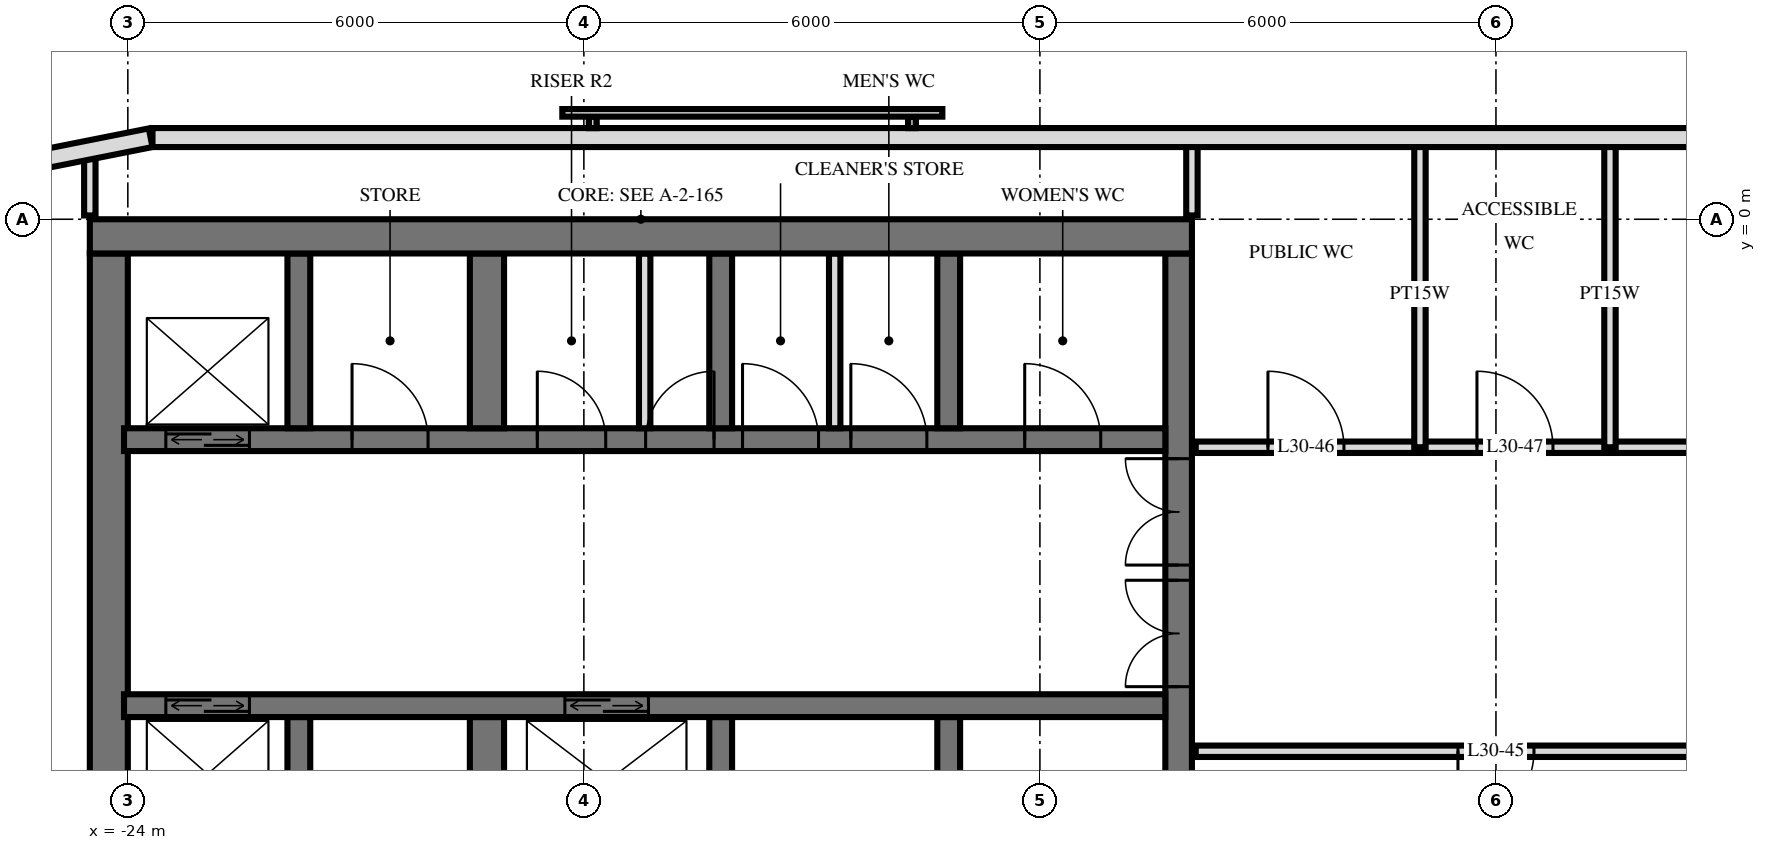
"""IFC4 building model, lengths in metres.
Left out: names, types, materials, properties, quantities, classifications, styles, units other than length and angle.
Written with IfcOpenShell. Run it as: python <this file> out.ifc"""

import sys

from ifc_helpers import new_model, si_unit, direction, frame, frame_2d, origin, place, context, subcontext, project, spatial, rectangle, extrude, element, fill, save


model = new_model("IFC4")
c1 = context("Model", 3, precision=1e-05, world=origin(), true_north=direction((0.0, 1.0)))
c2 = subcontext(c1, "Body", "Model", "MODEL_VIEW")
j1 = project(units=[si_unit("LENGTHUNIT", "METRE"), si_unit("PLANEANGLEUNIT", "RADIAN")], contexts=[c1])
p1 = place(None, origin())
s1 = spatial("IfcSite", under=j1, at=p1, CompositionType="ELEMENT")
p2 = place(p1, origin())
s2 = spatial("IfcBuilding", under=s1, at=p2, CompositionType="ELEMENT")
p3 = place(p2, frame((0.0, 0.0, 120.0)))
s3 = spatial("IfcBuildingStorey", under=s2, at=p3, CompositionType="ELEMENT", Elevation=120.0)
p4 = place(p3, frame((-24.5, -0.225, 0.0), z_axis=(0.0, 0.0, 1.0), x_axis=(1.0, 0.0, 0.0)))
e1 = element("IfcWall", 1, at=p4, inside=s3, PredefinedType="SHEAR", context=c2, shape_type="SweptSolid", body=[
    extrude(rectangle(XDim=14.5, YDim=0.45, at=frame_2d((7.25, 0.0))), origin(), (0.0, 0.0, 1.0), 3.6),
])
p5 = place(p3, frame((-10.175, -14.55, 0.0), z_axis=(0.0, 0.0, 1.0), x_axis=(0.0, 1.0, 0.0)))
e2 = element("IfcWall", 2, at=p5, inside=s3, PredefinedType="SHEAR", context=c2, shape_type="SweptSolid", body=[
    extrude(rectangle(XDim=14.1, YDim=0.35, at=frame_2d((7.05, 0.0))), origin(), (0.0, 0.0, 1.0), 3.6),
])
p6 = place(p5, frame((8.4, 0.0, 0.0)))
e3 = element("IfcOpeningElement", 3, at=p6, cuts=e2, PredefinedType="OPENING", context=c2, shape_type="SweptSolid", body=[
    extrude(rectangle(XDim=1.4, YDim=2.4, at=frame_2d((0.7, 1.2))), frame((0.0, 0.185, 0.0), z_axis=(0.0, -1.0, 0.0), x_axis=(1.0, 0.0, 0.0)), (0.0, 0.0, 1.0), 0.37),
])
p7 = place(p5, frame((10.0, 0.0, 0.0)))
e4 = element("IfcOpeningElement", 4, at=p7, cuts=e2, PredefinedType="OPENING", context=c2, shape_type="SweptSolid", body=[
    extrude(rectangle(XDim=1.4, YDim=2.4, at=frame_2d((0.7, 1.2))), frame((0.0, 0.185, 0.0), z_axis=(0.0, -1.0, 0.0), x_axis=(1.0, 0.0, 0.0)), (0.0, 0.0, 1.0), 0.37),
])
p8 = place(p5, frame((4.0, 0.0, 0.0)))
e5 = element("IfcOpeningElement", 5, at=p8, cuts=e2, PredefinedType="OPENING", context=c2, shape_type="SweptSolid", body=[
    extrude(rectangle(XDim=1.2, YDim=2.1, at=frame_2d((0.6, 1.05))), frame((0.0, 0.185, 0.0), z_axis=(0.0, -1.0, 0.0), x_axis=(1.0, 0.0, 0.0)), (0.0, 0.0, 1.0), 0.37),
])
p9 = place(p3, frame((-24.25, -14.55, 0.0), z_axis=(0.0, 0.0, 1.0), x_axis=(0.0, 1.0, 0.0)))
e6 = element("IfcWall", 6, at=p9, inside=s3, PredefinedType="SHEAR", context=c2, shape_type="SweptSolid", body=[
    extrude(rectangle(XDim=14.1, YDim=0.5, at=frame_2d((7.05, 0.0))), origin(), (0.0, 0.0, 1.0), 3.6),
])
p10 = place(p3, frame((-24.05, -2.9, 0.0), z_axis=(0.0, 0.0, 1.0), x_axis=(1.0, 0.0, 0.0)))
e7 = element("IfcWall", 7, at=p10, inside=s3, PredefinedType="SHEAR", context=c2, shape_type="SweptSolid", body=[
    extrude(rectangle(XDim=13.7, YDim=0.3, at=frame_2d((6.85, 0.0))), origin(), (0.0, 0.0, 1.0), 3.6),
])
p11 = place(p10, frame((0.55, 0.0, 0.0)))
e8 = element("IfcOpeningElement", 8, at=p11, cuts=e7, PredefinedType="OPENING", context=c2, shape_type="SweptSolid", body=[
    extrude(rectangle(XDim=1.1, YDim=2.1, at=frame_2d((0.55, 1.05))), frame((0.0, 0.16, 0.0), z_axis=(0.0, -1.0, 0.0), x_axis=(1.0, 0.0, 0.0)), (0.0, 0.0, 1.0), 0.32),
])
p12 = place(p10, frame((6.863, 0.0, 0.0)))
e9 = element("IfcOpeningElement", 9, at=p12, cuts=e7, PredefinedType="OPENING", context=c2, shape_type="SweptSolid", body=[
    extrude(rectangle(XDim=0.9, YDim=2.1, at=frame_2d((0.45, 1.05))), frame((0.0, 0.16, 0.0), z_axis=(0.0, -1.0, 0.0), x_axis=(1.0, 0.0, 0.0)), (0.0, 0.0, 1.0), 0.32),
])
p13 = place(p10, frame((5.438, 0.0, 0.0)))
e10 = element("IfcOpeningElement", 10, at=p13, cuts=e7, PredefinedType="OPENING", context=c2, shape_type="SweptSolid", body=[
    extrude(rectangle(XDim=0.9, YDim=2.1, at=frame_2d((0.45, 1.05))), frame((0.0, 0.16, 0.0), z_axis=(0.0, -1.0, 0.0), x_axis=(1.0, 0.0, 0.0)), (0.0, 0.0, 1.0), 0.32),
])
p14 = place(p10, frame((11.85, 0.0, 0.0)))
e11 = element("IfcOpeningElement", 11, at=p14, cuts=e7, PredefinedType="OPENING", context=c2, shape_type="SweptSolid", body=[
    extrude(rectangle(XDim=1.0, YDim=2.1, at=frame_2d((0.5, 1.05))), frame((0.0, 0.16, 0.0), z_axis=(0.0, -1.0, 0.0), x_axis=(1.0, 0.0, 0.0)), (0.0, 0.0, 1.0), 0.32),
])
p15 = place(p10, frame((9.562, 0.0, 0.0)))
e12 = element("IfcOpeningElement", 12, at=p15, cuts=e7, PredefinedType="OPENING", context=c2, shape_type="SweptSolid", body=[
    extrude(rectangle(XDim=1.0, YDim=2.1, at=frame_2d((0.5, 1.05))), frame((0.0, 0.16, 0.0), z_axis=(0.0, -1.0, 0.0), x_axis=(1.0, 0.0, 0.0)), (0.0, 0.0, 1.0), 0.32),
])
p16 = place(p10, frame((8.137, 0.0, 0.0)))
e13 = element("IfcOpeningElement", 13, at=p16, cuts=e7, PredefinedType="OPENING", context=c2, shape_type="SweptSolid", body=[
    extrude(rectangle(XDim=1.0, YDim=2.1, at=frame_2d((0.5, 1.05))), frame((0.0, 0.16, 0.0), z_axis=(0.0, -1.0, 0.0), x_axis=(1.0, 0.0, 0.0)), (0.0, 0.0, 1.0), 0.32),
])
p17 = place(p10, frame((3.0, 0.0, 0.0)))
e14 = element("IfcOpeningElement", 14, at=p17, cuts=e7, PredefinedType="OPENING", context=c2, shape_type="SweptSolid", body=[
    extrude(rectangle(XDim=1.0, YDim=2.1, at=frame_2d((0.5, 1.05))), frame((0.0, 0.16, 0.0), z_axis=(0.0, -1.0, 0.0), x_axis=(1.0, 0.0, 0.0)), (0.0, 0.0, 1.0), 0.32),
])
p18 = place(p3, frame((-24.05, -6.4, 0.0), z_axis=(0.0, 0.0, 1.0), x_axis=(1.0, 0.0, 0.0)))
e15 = element("IfcWall", 15, at=p18, inside=s3, PredefinedType="SHEAR", context=c2, shape_type="SweptSolid", body=[
    extrude(rectangle(XDim=13.7, YDim=0.3, at=frame_2d((6.85, 0.0))), origin(), (0.0, 0.0, 1.0), 3.6),
])
p19 = place(p18, frame((0.55, 0.0, 0.0)))
e16 = element("IfcOpeningElement", 16, at=p19, cuts=e15, PredefinedType="OPENING", context=c2, shape_type="SweptSolid", body=[
    extrude(rectangle(XDim=1.1, YDim=2.1, at=frame_2d((0.55, 1.05))), frame((0.0, 0.16, 0.0), z_axis=(0.0, -1.0, 0.0), x_axis=(1.0, 0.0, 0.0)), (0.0, 0.0, 1.0), 0.32),
])
p20 = place(p18, frame((5.8, 0.0, 0.0)))
e17 = element("IfcOpeningElement", 17, at=p20, cuts=e15, PredefinedType="OPENING", context=c2, shape_type="SweptSolid", body=[
    extrude(rectangle(XDim=1.1, YDim=2.1, at=frame_2d((0.55, 1.05))), frame((0.0, 0.16, 0.0), z_axis=(0.0, -1.0, 0.0), x_axis=(1.0, 0.0, 0.0)), (0.0, 0.0, 1.0), 0.32),
])
for number, where, z_axis, x_axis in (
    (18, (-13.2, -2.75, 0.0), (0.0, 0.0, 1.0), (0.0, 1.0, 0.0)),
    (19, (-13.2, -8.85, 0.0), (0.0, 0.0, 1.0), (0.0, 1.0, 0.0)),
    (20, (-16.2, -2.75, 0.0), (0.0, 0.0, 1.0), (0.0, 1.0, 0.0)),
    (21, (-16.2, -8.85, 0.0), (0.0, 0.0, 1.0), (0.0, 1.0, 0.0)),
):
    element("IfcWall", number, at=place(p3, frame(where, z_axis=z_axis, x_axis=x_axis)), inside=s3, PredefinedType="SHEAR", context=c2, shape_type="SweptSolid", body=[
        extrude(rectangle(XDim=2.3, YDim=0.3, at=frame_2d((1.15, 0.0))), origin(), (0.0, 0.0, 1.0), 3.6),
    ])
for number, where, z_axis, x_axis in (
    (22, (-19.275, -2.75, 0.0), (0.0, 0.0, 1.0), (0.0, 1.0, 0.0)),
    (23, (-19.275, -8.85, 0.0), (0.0, 0.0, 1.0), (0.0, 1.0, 0.0)),
):
    element("IfcWall", number, at=place(p3, frame(where, z_axis=z_axis, x_axis=x_axis)), inside=s3, PredefinedType="SHEAR", context=c2, shape_type="SweptSolid", body=[
        extrude(rectangle(XDim=2.3, YDim=0.45, at=frame_2d((1.15, 0.0))), origin(), (0.0, 0.0, 1.0), 3.6),
    ])
for number, where, z_axis, x_axis in (
    (24, (-21.75, -2.75, 0.0), (0.0, 0.0, 1.0), (0.0, 1.0, 0.0)),
    (25, (-21.75, -8.85, 0.0), (0.0, 0.0, 1.0), (0.0, 1.0, 0.0)),
):
    element("IfcWall", number, at=place(p3, frame(where, z_axis=z_axis, x_axis=x_axis)), inside=s3, PredefinedType="SHEAR", context=c2, shape_type="SweptSolid", body=[
        extrude(rectangle(XDim=2.3, YDim=0.3, at=frame_2d((1.15, 0.0))), origin(), (0.0, 0.0, 1.0), 3.6),
    ])
p21 = place(p3, frame((23.675, 1.075, 0.0), z_axis=(0.0, 0.0, 1.0), x_axis=(-1.0, 0.0, 0.0)))
e26 = element("IfcWall", 26, at=p21, inside=s3, PredefinedType="SOLIDWALL", context=c2, shape_type="SweptSolid", body=[
    extrude(rectangle(XDim=47.351, YDim=0.25, at=frame_2d((23.675, 0.0))), origin(), (0.0, 0.0, 1.0), 3.32),
])
p22 = place(p21, frame((15.275, 0.0, 0.3)))
e27 = element("IfcOpeningElement", 27, at=p22, cuts=e26, PredefinedType="OPENING", context=c2, shape_type="SweptSolid", body=[
    extrude(rectangle(XDim=2.4, YDim=2.1, at=frame_2d((1.2, 1.05))), frame((0.0, 0.135, 0.0), z_axis=(0.0, -1.0, 0.0), x_axis=(1.0, 0.0, 0.0)), (0.0, 0.0, 1.0), 0.27),
])
p23 = place(p21, frame((18.275, 0.0, 0.3)))
e28 = element("IfcOpeningElement", 28, at=p23, cuts=e26, PredefinedType="OPENING", context=c2, shape_type="SweptSolid", body=[
    extrude(rectangle(XDim=2.4, YDim=2.1, at=frame_2d((1.2, 1.05))), frame((0.0, 0.135, 0.0), z_axis=(0.0, -1.0, 0.0), x_axis=(1.0, 0.0, 0.0)), (0.0, 0.0, 1.0), 0.27),
])
p24 = place(p21, frame((24.275, 0.0, 0.3)))
e29 = element("IfcOpeningElement", 29, at=p24, cuts=e26, PredefinedType="OPENING", context=c2, shape_type="SweptSolid", body=[
    extrude(rectangle(XDim=2.4, YDim=2.1, at=frame_2d((1.2, 1.05))), frame((0.0, 0.135, 0.0), z_axis=(0.0, -1.0, 0.0), x_axis=(1.0, 0.0, 0.0)), (0.0, 0.0, 1.0), 0.27),
])
p25 = place(p3, frame((-23.7, 1.073, 0.0), z_axis=(0.0, 0.0, 1.0), x_axis=(-0.980803419081, -0.194999110559, 0.0)))
e30 = element("IfcWall", 30, at=p25, inside=s3, PredefinedType="SOLIDWALL", context=c2, shape_type="SweptSolid", body=[
    extrude(rectangle(XDim=1.681, YDim=0.25, at=frame_2d((0.841, 0.0))), origin(), (0.0, 0.0, 1.0), 3.32),
])
for number, where, z_axis, x_axis in (
    (31, (-17.2, -2.75, 0.0), (0.0, 0.0, 1.0), (0.0, 1.0, 0.0)),
    (32, (-14.7, -2.75, 0.0), (0.0, 0.0, 1.0), (0.0, 1.0, 0.0)),
):
    element("IfcWall", number, at=place(p3, frame(where, z_axis=z_axis, x_axis=x_axis)), inside=s3, PredefinedType="PARTITIONING", context=c2, shape_type="SweptSolid", body=[
        extrude(rectangle(XDim=2.3, YDim=0.15, at=frame_2d((1.15, 0.0))), origin(), (0.0, 0.0, 1.0), 3.3),
    ])
for number, where, z_axis, x_axis in (
    (33, (-4.5, -3.0, 0.0), (0.0, 0.0, 1.0), (0.0, 1.0, 0.0)),
    (34, (-7.0, -3.0, 0.0), (0.0, 0.0, 1.0), (0.0, 1.0, 0.0)),
):
    element("IfcWall", number, at=place(p3, frame(where, z_axis=z_axis, x_axis=x_axis)), inside=s3, PredefinedType="PLUMBINGWALL", context=c2, shape_type="SweptSolid", body=[
        extrude(rectangle(XDim=4.02, YDim=0.15, at=frame_2d((2.01, 0.0))), origin(), (0.0, 0.0, 1.0), 3.32),
    ])
p26 = place(p3, frame((-10.0, 0.05, 0.0), z_axis=(0.0, 0.0, 1.0), x_axis=(0.0, 1.0, 0.0)))
e35 = element("IfcWall", 35, at=p26, inside=s3, PredefinedType="PLUMBINGWALL", context=c2, shape_type="SweptSolid", body=[
    extrude(rectangle(XDim=0.97, YDim=0.15, at=frame_2d((0.485, 0.0))), origin(), (0.0, 0.0, 1.0), 3.32),
])
p27 = place(p3, frame((-24.5, 0.05, 0.0), z_axis=(0.0, 0.0, 1.0), x_axis=(0.0, 1.0, 0.0)))
e36 = element("IfcWall", 36, at=p27, inside=s3, PredefinedType="PARTITIONING", context=c2, shape_type="SweptSolid", body=[
    extrude(rectangle(XDim=0.807, YDim=0.15, at=frame_2d((0.404, 0.0))), origin(), (0.0, 0.0, 1.0), 3.32),
])
p28 = place(p3, frame((-9.95, -7.0, 0.0), z_axis=(0.0, 0.0, 1.0), x_axis=(1.0, 0.0, 0.0)))
e37 = element("IfcWall", 37, at=p28, inside=s3, PredefinedType="PARTITIONING", context=c2, shape_type="SweptSolid", body=[
    extrude(rectangle(XDim=19.9, YDim=0.15, at=frame_2d((9.95, 0.0))), origin(), (0.0, 0.0, 1.0), 3.32),
])
p29 = place(p28, frame((9.45, 0.0, 0.0)))
e38 = element("IfcOpeningElement", 38, at=p29, cuts=e37, PredefinedType="OPENING", context=c2, shape_type="SweptSolid", body=[
    extrude(rectangle(XDim=1.0, YDim=2.1, at=frame_2d((0.5, 1.05))), frame((0.0, 0.085, 0.0), z_axis=(0.0, -1.0, 0.0), x_axis=(1.0, 0.0, 0.0)), (0.0, 0.0, 1.0), 0.17),
])
p30 = place(p28, frame((3.45, 0.0, 0.0)))
e39 = element("IfcOpeningElement", 39, at=p30, cuts=e37, PredefinedType="OPENING", context=c2, shape_type="SweptSolid", body=[
    extrude(rectangle(XDim=1.0, YDim=2.1, at=frame_2d((0.5, 1.05))), frame((0.0, 0.085, 0.0), z_axis=(0.0, -1.0, 0.0), x_axis=(1.0, 0.0, 0.0)), (0.0, 0.0, 1.0), 0.17),
])
p31 = place(p3, frame((-9.95, -3.0, 0.0), z_axis=(0.0, 0.0, 1.0), x_axis=(1.0, 0.0, 0.0)))
e40 = element("IfcWall", 40, at=p31, inside=s3, PredefinedType="PARTITIONING", context=c2, shape_type="SweptSolid", body=[
    extrude(rectangle(XDim=19.9, YDim=0.15, at=frame_2d((9.95, 0.0))), origin(), (0.0, 0.0, 1.0), 3.32),
])
p32 = place(p31, frame((0.95, 0.0, 0.0)))
e41 = element("IfcOpeningElement", 41, at=p32, cuts=e40, PredefinedType="OPENING", context=c2, shape_type="SweptSolid", body=[
    extrude(rectangle(XDim=1.0, YDim=2.1, at=frame_2d((0.5, 1.05))), frame((0.0, 0.085, 0.0), z_axis=(0.0, -1.0, 0.0), x_axis=(1.0, 0.0, 0.0)), (0.0, 0.0, 1.0), 0.17),
])
p33 = place(p31, frame((3.7, 0.0, 0.0)))
e42 = element("IfcOpeningElement", 42, at=p33, cuts=e40, PredefinedType="OPENING", context=c2, shape_type="SweptSolid", body=[
    extrude(rectangle(XDim=1.0, YDim=2.1, at=frame_2d((0.5, 1.05))), frame((0.0, 0.085, 0.0), z_axis=(0.0, -1.0, 0.0), x_axis=(1.0, 0.0, 0.0)), (0.0, 0.0, 1.0), 0.17),
])
p34 = place(p31, frame((8.45, 0.0, 0.0)))
e43 = element("IfcOpeningElement", 43, at=p34, cuts=e40, PredefinedType="OPENING", context=c2, shape_type="SweptSolid", body=[
    extrude(rectangle(XDim=1.0, YDim=2.1, at=frame_2d((0.5, 1.05))), frame((0.0, 0.085, 0.0), z_axis=(0.0, -1.0, 0.0), x_axis=(1.0, 0.0, 0.0)), (0.0, 0.0, 1.0), 0.17),
])
p35 = place(p31, frame((15.7, 0.0, 0.0)))
e44 = element("IfcOpeningElement", 44, at=p35, cuts=e40, PredefinedType="OPENING", context=c2, shape_type="SweptSolid", body=[
    extrude(rectangle(XDim=1.0, YDim=2.1, at=frame_2d((0.5, 1.05))), frame((0.0, 0.085, 0.0), z_axis=(0.0, -1.0, 0.0), x_axis=(1.0, 0.0, 0.0)), (0.0, 0.0, 1.0), 0.17),
])
p36 = place(p11, origin())
e45 = element("IfcDoor", 45, at=p36, inside=s3, OperationType="DOUBLE_DOOR_SLIDING", PredefinedType="USERDEFINED", context=c2, shape_type="SweptSolid", body=[
    extrude(rectangle(XDim=1.1, YDim=2.1, at=frame_2d((0.55, 1.05))), frame((0.0, 0.025, 0.0), z_axis=(0.0, -1.0, 0.0), x_axis=(1.0, 0.0, 0.0)), (0.0, 0.0, 1.0), 0.05),
])
fill(e8, e45)
p37 = place(p19, origin())
e46 = element("IfcDoor", 46, at=p37, inside=s3, OperationType="DOUBLE_DOOR_SLIDING", PredefinedType="USERDEFINED", context=c2, shape_type="SweptSolid", body=[
    extrude(rectangle(XDim=1.1, YDim=2.1, at=frame_2d((0.55, 1.05))), frame((0.0, 0.025, 0.0), z_axis=(0.0, -1.0, 0.0), x_axis=(1.0, 0.0, 0.0)), (0.0, 0.0, 1.0), 0.05),
])
fill(e16, e46)
p38 = place(p20, origin())
e47 = element("IfcDoor", 47, at=p38, inside=s3, OperationType="DOUBLE_DOOR_SLIDING", PredefinedType="USERDEFINED", context=c2, shape_type="SweptSolid", body=[
    extrude(rectangle(XDim=1.1, YDim=2.1, at=frame_2d((0.55, 1.05))), frame((0.0, 0.025, 0.0), z_axis=(0.0, -1.0, 0.0), x_axis=(1.0, 0.0, 0.0)), (0.0, 0.0, 1.0), 0.05),
])
fill(e17, e47)
p39 = place(p6, origin())
e48 = element("IfcDoor", 48, at=p39, inside=s3, OperationType="DOUBLE_DOOR_SINGLE_SWING", PredefinedType="DOOR", context=c2, shape_type="SweptSolid", body=[
    extrude(rectangle(XDim=1.4, YDim=2.4, at=frame_2d((0.7, 1.2))), frame((0.0, 0.025, 0.0), z_axis=(0.0, -1.0, 0.0), x_axis=(1.0, 0.0, 0.0)), (0.0, 0.0, 1.0), 0.05),
])
fill(e3, e48)
p40 = place(p7, origin())
e49 = element("IfcDoor", 49, at=p40, inside=s3, OperationType="DOUBLE_DOOR_SINGLE_SWING", PredefinedType="DOOR", context=c2, shape_type="SweptSolid", body=[
    extrude(rectangle(XDim=1.4, YDim=2.4, at=frame_2d((0.7, 1.2))), frame((0.0, 0.025, 0.0), z_axis=(0.0, -1.0, 0.0), x_axis=(1.0, 0.0, 0.0)), (0.0, 0.0, 1.0), 0.05),
])
fill(e4, e49)
p41 = place(p12, origin())
e50 = element("IfcDoor", 50, at=p41, inside=s3, OperationType="SINGLE_SWING_LEFT", PredefinedType="DOOR", context=c2, shape_type="SweptSolid", body=[
    extrude(rectangle(XDim=0.9, YDim=2.1, at=frame_2d((0.45, 1.05))), frame((0.0, 0.025, 0.0), z_axis=(0.0, -1.0, 0.0), x_axis=(1.0, 0.0, 0.0)), (0.0, 0.0, 1.0), 0.05),
])
fill(e9, e50)
p42 = place(p13, origin())
e51 = element("IfcDoor", 51, at=p42, inside=s3, OperationType="SINGLE_SWING_RIGHT", PredefinedType="DOOR", context=c2, shape_type="SweptSolid", body=[
    extrude(rectangle(XDim=0.9, YDim=2.1, at=frame_2d((0.45, 1.05))), frame((0.0, 0.025, 0.0), z_axis=(0.0, -1.0, 0.0), x_axis=(1.0, 0.0, 0.0)), (0.0, 0.0, 1.0), 0.05),
])
fill(e10, e51)
p43 = place(p14, origin())
e52 = element("IfcDoor", 52, at=p43, inside=s3, OperationType="SINGLE_SWING_RIGHT", PredefinedType="DOOR", context=c2, shape_type="SweptSolid", body=[
    extrude(rectangle(XDim=1.0, YDim=2.1, at=frame_2d((0.5, 1.05))), frame((0.0, 0.025, 0.0), z_axis=(0.0, -1.0, 0.0), x_axis=(1.0, 0.0, 0.0)), (0.0, 0.0, 1.0), 0.05),
])
fill(e11, e52)
p44 = place(p15, origin())
e53 = element("IfcDoor", 53, at=p44, inside=s3, OperationType="SINGLE_SWING_RIGHT", PredefinedType="DOOR", context=c2, shape_type="SweptSolid", body=[
    extrude(rectangle(XDim=1.0, YDim=2.1, at=frame_2d((0.5, 1.05))), frame((0.0, 0.025, 0.0), z_axis=(0.0, -1.0, 0.0), x_axis=(1.0, 0.0, 0.0)), (0.0, 0.0, 1.0), 0.05),
])
fill(e12, e53)
p45 = place(p16, origin())
e54 = element("IfcDoor", 54, at=p45, inside=s3, OperationType="SINGLE_SWING_RIGHT", PredefinedType="DOOR", context=c2, shape_type="SweptSolid", body=[
    extrude(rectangle(XDim=1.0, YDim=2.1, at=frame_2d((0.5, 1.05))), frame((0.0, 0.025, 0.0), z_axis=(0.0, -1.0, 0.0), x_axis=(1.0, 0.0, 0.0)), (0.0, 0.0, 1.0), 0.05),
])
fill(e13, e54)
p46 = place(p17, origin())
e55 = element("IfcDoor", 55, at=p46, inside=s3, OperationType="SINGLE_SWING_RIGHT", PredefinedType="DOOR", context=c2, shape_type="SweptSolid", body=[
    extrude(rectangle(XDim=1.0, YDim=2.1, at=frame_2d((0.5, 1.05))), frame((0.0, 0.025, 0.0), z_axis=(0.0, -1.0, 0.0), x_axis=(1.0, 0.0, 0.0)), (0.0, 0.0, 1.0), 0.05),
])
fill(e14, e55)
p47 = place(p30, frame((0.5, 0.0, 0.0), z_axis=(0.0, 0.0, 1.0), x_axis=(-1.0, 0.0, 0.0)))
e56 = element("IfcDoor", 56, at=p47, inside=s3, OperationType="SINGLE_SWING_LEFT", PredefinedType="DOOR", context=c2, shape_type="SweptSolid", body=[
    extrude(rectangle(XDim=1.0, YDim=2.1, at=frame_2d((0.0, 1.05))), frame((0.0, -0.025, 0.0), z_axis=(0.0, 1.0, 0.0), x_axis=(-1.0, 0.0, 0.0)), (0.0, 0.0, 1.0), 0.05),
])
fill(e39, e56)
p48 = place(p32, origin())
e57 = element("IfcDoor", 57, at=p48, inside=s3, OperationType="SINGLE_SWING_RIGHT", PredefinedType="DOOR", context=c2, shape_type="SweptSolid", body=[
    extrude(rectangle(XDim=1.0, YDim=2.1, at=frame_2d((0.5, 1.05))), frame((0.0, 0.025, 0.0), z_axis=(0.0, -1.0, 0.0), x_axis=(1.0, 0.0, 0.0)), (0.0, 0.0, 1.0), 0.05),
])
fill(e41, e57)
p49 = place(p33, origin())
e58 = element("IfcDoor", 58, at=p49, inside=s3, OperationType="SINGLE_SWING_RIGHT", PredefinedType="DOOR", context=c2, shape_type="SweptSolid", body=[
    extrude(rectangle(XDim=1.0, YDim=2.1, at=frame_2d((0.5, 1.05))), frame((0.0, 0.025, 0.0), z_axis=(0.0, -1.0, 0.0), x_axis=(1.0, 0.0, 0.0)), (0.0, 0.0, 1.0), 0.05),
])
fill(e42, e58)
save(model, sys.argv[1])
